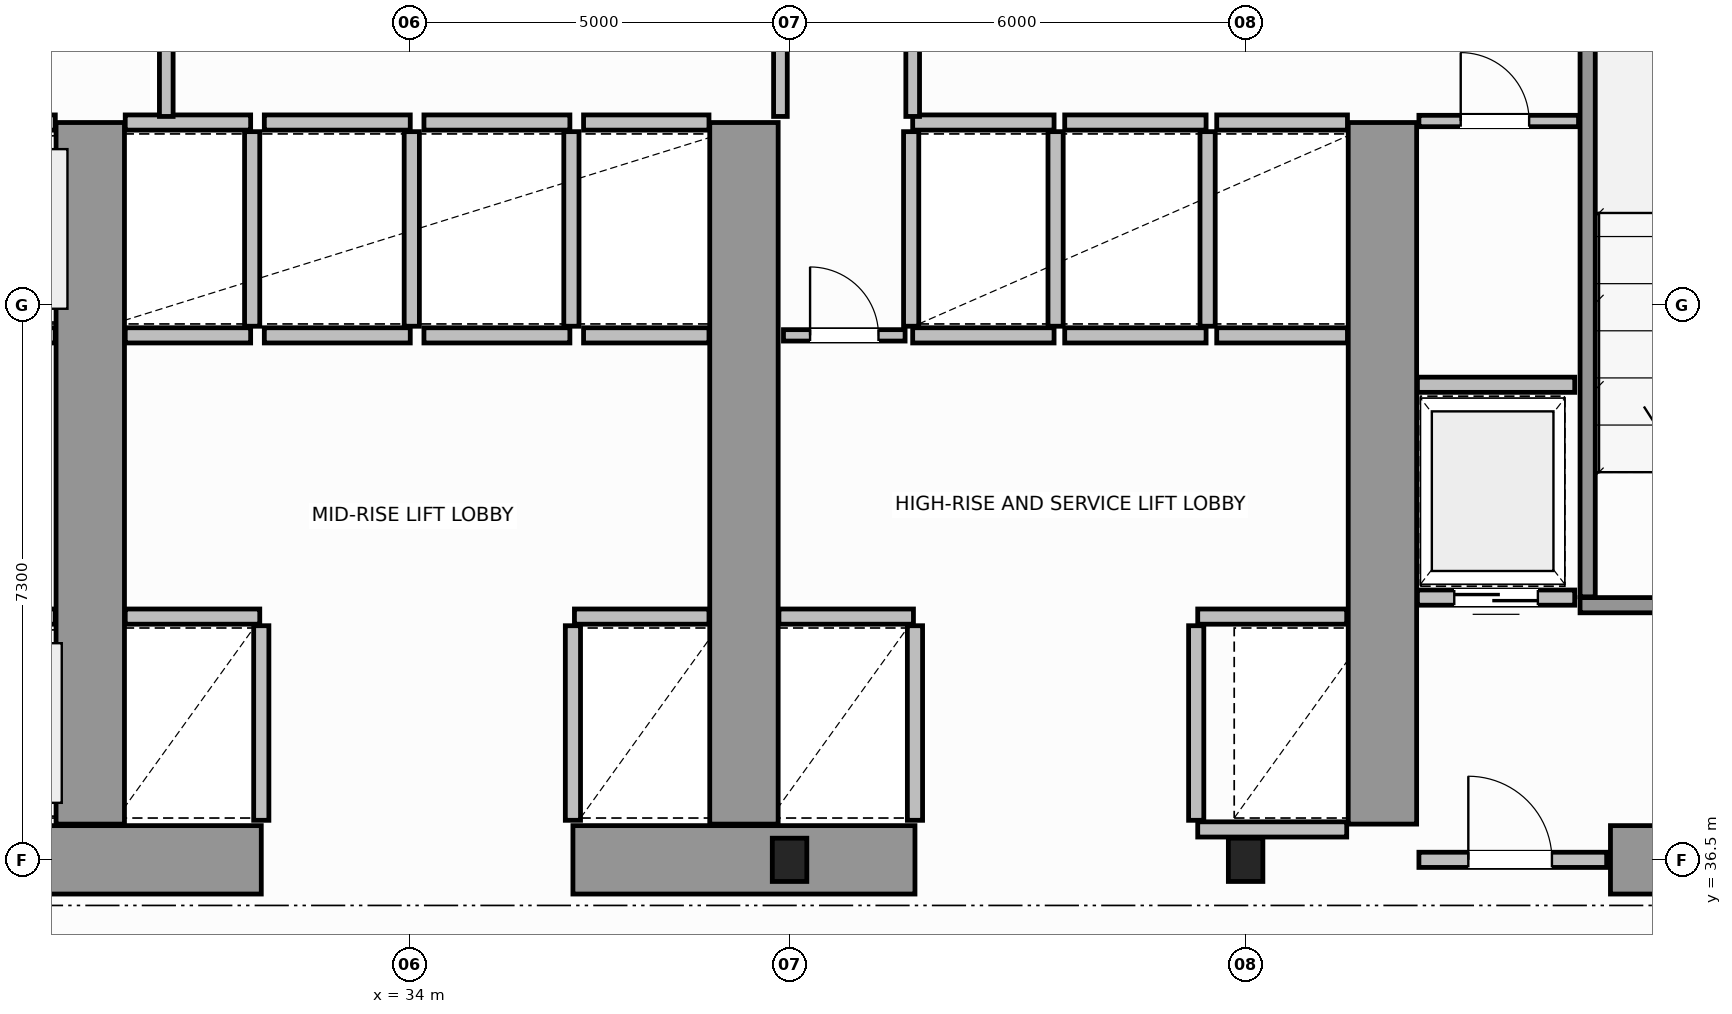
"""IFC4 building model, lengths in metres.
Left out: names, types, materials, properties, quantities, classifications, styles, units other than length and angle.
Written with IfcOpenShell. Run it as: python <this file> out.ifc"""

import sys

from ifc_helpers import new_model, si_unit, direction, frame, frame_2d, origin, origin_2d, place, context, subcontext, project, spatial, rectangle, i_section, extrude, source, transform, mapped, element, fill, save


model = new_model("IFC4")
c1 = context("Model", 3, precision=1e-05, world=origin(), true_north=direction((0.0, 1.0)))
c2 = subcontext(c1, "Body", "Model", "MODEL_VIEW")
j1 = project(units=[si_unit("LENGTHUNIT", "METRE"), si_unit("PLANEANGLEUNIT", "RADIAN")], contexts=[c1])
p1 = place(None, origin())
s1 = spatial("IfcSite", under=j1, at=p1, CompositionType="ELEMENT")
p2 = place(p1, origin())
s2 = spatial("IfcBuilding", under=s1, at=p2, CompositionType="ELEMENT")
p3 = place(p2, frame((0.0, 0.0, 30.2)))
s3 = spatial("IfcBuildingStorey", under=s2, at=p3, CompositionType="ELEMENT", Elevation=30.2)
m1 = source(origin(), c2, "Body", "SweptSolid", [
    extrude(i_section(OverallWidth=0.454, OverallDepth=0.569, WebThickness=0.078, FlangeThickness=0.08, FilletRadius=0.015, at=origin_2d()), origin(), (0.0, 0.0, 1.0), 3.8),
])
for number, where, z_axis, x_axis in (
    (1, (39.0, 36.5, 0.0), (0.0, 0.0, 1.0), (1.0, 0.0, 0.0)),
    (2, (45.0, 36.5, 0.0), (0.0, 0.0, 1.0), (1.0, 0.0, 0.0)),
):
    element("IfcColumn", number, at=place(p3, frame(where, z_axis=z_axis, x_axis=x_axis)), inside=s3, PredefinedType="COLUMN", context=c2, shape_type="MappedRepresentation", body=[
        mapped(m1, transform((0.0, 0.0, 0.0), scale=1.0)),
    ])
for number, where, z_axis, x_axis in (
    (3, (27.55, 36.5, 0.0), (0.0, 0.0, 1.0), (1.0, 0.0, 0.0)),
    (4, (36.15, 36.5, 0.0), (0.0, 0.0, 1.0), (1.0, 0.0, 0.0)),
):
    element("IfcWall", number, at=place(p3, frame(where, z_axis=z_axis, x_axis=x_axis)), inside=s3, PredefinedType="SHEAR", context=c2, shape_type="SweptSolid", body=[
        extrude(rectangle(XDim=4.5, YDim=0.9, at=frame_2d((2.25, 0.0))), origin(), (0.0, 0.0, 1.0), 3.8),
    ])
p4 = place(p3, frame((49.8, 36.5, 0.0), z_axis=(0.0, 0.0, 1.0), x_axis=(1.0, 0.0, 0.0)))
e5 = element("IfcWall", 5, at=p4, inside=s3, PredefinedType="SHEAR", context=c2, shape_type="SweptSolid", body=[
    extrude(rectangle(XDim=3.73, YDim=0.9, at=frame_2d((1.865, 0.0))), origin(), (0.0, 0.0, 1.0), 2.38),
])
for number, where, z_axis, x_axis in (
    (6, (29.8, 36.97, 0.0), (0.0, 0.0, 1.0), (0.0, 1.0, 0.0)),
    (7, (38.4, 36.97, 0.0), (0.0, 0.0, 1.0), (0.0, 1.0, 0.0)),
    (8, (46.8, 36.97, 0.0), (0.0, 0.0, 1.0), (0.0, 1.0, 0.0)),
):
    element("IfcWall", number, at=place(p3, frame(where, z_axis=z_axis, x_axis=x_axis)), inside=s3, PredefinedType="SHEAR", context=c2, shape_type="SweptSolid", body=[
        extrude(rectangle(XDim=9.23, YDim=0.9, at=frame_2d((4.615, 0.0))), origin(), (0.0, 0.0, 1.0), 3.8),
    ])
p5 = place(p3, frame((49.4, 39.85, 0.0), z_axis=(0.0, 0.0, 1.0), x_axis=(1.0, 0.0, 0.0)))
e9 = element("IfcWall", 9, at=p5, inside=s3, PredefinedType="SOLIDWALL", context=c2, shape_type="SweptSolid", body=[
    extrude(rectangle(XDim=4.15, YDim=0.2, at=frame_2d((2.075, 0.0))), origin(), (0.0, 0.0, 1.0), 3.8),
])
p6 = place(p5, frame((1.325, 0.0, 0.0)))
e10 = element("IfcOpeningElement", 10, at=p6, cuts=e9, PredefinedType="OPENING", context=c2, shape_type="SweptSolid", body=[
    extrude(rectangle(XDim=1.1, YDim=2.15, at=frame_2d((0.55, 1.075))), frame((0.0, 0.11, 0.0), z_axis=(0.0, -1.0, 0.0), x_axis=(1.0, 0.0, 0.0)), (0.0, 0.0, 1.0), 0.22),
])
p7 = place(p3, frame((49.5, 39.96, 0.0), z_axis=(0.0, 0.0, 1.0), x_axis=(0.0, 1.0, 0.0)))
e11 = element("IfcWall", 11, at=p7, inside=s3, PredefinedType="SOLIDWALL", context=c2, shape_type="SweptSolid", body=[
    extrude(rectangle(XDim=9.93, YDim=0.2, at=frame_2d((4.965, 0.0))), origin(), (0.0, 0.0, 1.0), 3.8),
])
p8 = place(p3, frame((47.28, 36.5, 0.0), z_axis=(0.0, 0.0, 1.0), x_axis=(1.0, 0.0, 0.0)))
e12 = element("IfcWall", 12, at=p8, inside=s3, PredefinedType="SOLIDWALL", context=c2, shape_type="SweptSolid", body=[
    extrude(rectangle(XDim=2.47, YDim=0.2, at=frame_2d((1.235, 0.0))), origin(), (0.0, 0.0, 1.0), 2.37),
])
p9 = place(p8, frame((0.65, 0.0, 0.0)))
e13 = element("IfcOpeningElement", 13, at=p9, cuts=e12, PredefinedType="OPENING", context=c2, shape_type="SweptSolid", body=[
    extrude(rectangle(XDim=1.1, YDim=2.15, at=frame_2d((0.55, 1.075))), frame((0.0, 0.11, 0.0), z_axis=(0.0, -1.0, 0.0), x_axis=(1.0, 0.0, 0.0)), (0.0, 0.0, 1.0), 0.22),
])
p10 = place(p3, frame((27.57, 39.7, 0.0), z_axis=(0.0, 0.0, 1.0), x_axis=(1.0, 0.0, 0.0)))
e14 = element("IfcWall", 14, at=p10, inside=s3, PredefinedType="SOLIDWALL", context=c2, shape_type="SweptSolid", body=[
    extrude(rectangle(XDim=1.77, YDim=0.2, at=frame_2d((0.885, 0.0))), origin(), (0.0, 0.0, 1.0), 3.58),
])
p11 = place(p10, frame((0.335, 0.0, 0.0)))
e15 = element("IfcOpeningElement", 15, at=p11, cuts=e14, PredefinedType="OPENING", context=c2, shape_type="SweptSolid", body=[
    extrude(rectangle(XDim=1.1, YDim=2.15, at=frame_2d((0.55, 1.075))), frame((0.0, 0.11, 0.0), z_axis=(0.0, -1.0, 0.0), x_axis=(1.0, 0.0, 0.0)), (0.0, 0.0, 1.0), 0.22),
])
p12 = place(p3, frame((27.69, 43.4, 0.0), z_axis=(0.0, 0.0, 1.0), x_axis=(1.0, 0.0, 0.0)))
e16 = element("IfcWall", 16, at=p12, inside=s3, PredefinedType="SOLIDWALL", context=c2, shape_type="SweptSolid", body=[
    extrude(rectangle(XDim=1.65, YDim=0.2, at=frame_2d((0.825, 0.0))), origin(), (0.0, 0.0, 1.0), 3.58),
])
p13 = place(p12, frame((0.275, 0.0, 0.0)))
e17 = element("IfcOpeningElement", 17, at=p13, cuts=e16, PredefinedType="OPENING", context=c2, shape_type="SweptSolid", body=[
    extrude(rectangle(XDim=1.1, YDim=2.15, at=frame_2d((0.55, 1.075))), frame((0.0, 0.11, 0.0), z_axis=(0.0, -1.0, 0.0), x_axis=(1.0, 0.0, 0.0)), (0.0, 0.0, 1.0), 0.22),
])
p14 = place(p3, frame((27.69, 46.2, 0.0), z_axis=(0.0, 0.0, 1.0), x_axis=(1.0, 0.0, 0.0)))
e18 = element("IfcWall", 18, at=p14, inside=s3, PredefinedType="SOLIDWALL", context=c2, shape_type="SweptSolid", body=[
    extrude(rectangle(XDim=1.65, YDim=0.2, at=frame_2d((0.825, 0.0))), origin(), (0.0, 0.0, 1.0), 3.58),
])
p15 = place(p3, frame((30.26, 39.7, 0.0), z_axis=(0.0, 0.0, 1.0), x_axis=(1.0, 0.0, 0.0)))
e19 = element("IfcWall", 19, at=p15, inside=s3, PredefinedType="SOLIDWALL", context=c2, shape_type="SweptSolid", body=[
    extrude(rectangle(XDim=1.77, YDim=0.2, at=frame_2d((0.885, 0.0))), origin(), (0.0, 0.0, 1.0), 3.58),
])
p16 = place(p3, frame((32.05, 37.02, 0.0), z_axis=(0.0, 0.0, 1.0), x_axis=(0.0, 1.0, 0.0)))
e20 = element("IfcWall", 20, at=p16, inside=s3, PredefinedType="SOLIDWALL", context=c2, shape_type="SweptSolid", body=[
    extrude(rectangle(XDim=2.56, YDim=0.2, at=frame_2d((1.28, 0.0))), origin(), (0.0, 0.0, 1.0), 3.58),
])
p17 = place(p3, frame((36.17, 39.7, 0.0), z_axis=(0.0, 0.0, 1.0), x_axis=(1.0, 0.0, 0.0)))
e21 = element("IfcWall", 21, at=p17, inside=s3, PredefinedType="SOLIDWALL", context=c2, shape_type="SweptSolid", body=[
    extrude(rectangle(XDim=1.77, YDim=0.2, at=frame_2d((0.885, 0.0))), origin(), (0.0, 0.0, 1.0), 3.58),
])
p18 = place(p3, frame((36.15, 37.02, 0.0), z_axis=(0.0, 0.0, 1.0), x_axis=(0.0, 1.0, 0.0)))
e22 = element("IfcWall", 22, at=p18, inside=s3, PredefinedType="SOLIDWALL", context=c2, shape_type="SweptSolid", body=[
    extrude(rectangle(XDim=2.56, YDim=0.2, at=frame_2d((1.28, 0.0))), origin(), (0.0, 0.0, 1.0), 3.58),
])
for number, where, z_axis, x_axis in (
    (23, (30.26, 43.4, 0.0), (0.0, 0.0, 1.0), (1.0, 0.0, 0.0)),
    (24, (30.26, 46.2, 0.0), (0.0, 0.0, 1.0), (1.0, 0.0, 0.0)),
):
    element("IfcWall", number, at=place(p3, frame(where, z_axis=z_axis, x_axis=x_axis)), inside=s3, PredefinedType="SOLIDWALL", context=c2, shape_type="SweptSolid", body=[
        extrude(rectangle(XDim=1.65, YDim=0.2, at=frame_2d((0.825, 0.0))), origin(), (0.0, 0.0, 1.0), 3.58),
    ])
p19 = place(p3, frame((31.93, 43.52, 0.0), z_axis=(0.0, 0.0, 1.0), x_axis=(0.0, 1.0, 0.0)))
e25 = element("IfcWall", 25, at=p19, inside=s3, PredefinedType="SOLIDWALL", context=c2, shape_type="SweptSolid", body=[
    extrude(rectangle(XDim=2.56, YDim=0.2, at=frame_2d((1.28, 0.0))), origin(), (0.0, 0.0, 1.0), 3.58),
])
for number, where, z_axis, x_axis in (
    (26, (32.09, 43.4, 0.0), (0.0, 0.0, 1.0), (1.0, 0.0, 0.0)),
    (27, (32.09, 46.2, 0.0), (0.0, 0.0, 1.0), (1.0, 0.0, 0.0)),
):
    element("IfcWall", number, at=place(p3, frame(where, z_axis=z_axis, x_axis=x_axis)), inside=s3, PredefinedType="SOLIDWALL", context=c2, shape_type="SweptSolid", body=[
        extrude(rectangle(XDim=1.92, YDim=0.2, at=frame_2d((0.96, 0.0))), origin(), (0.0, 0.0, 1.0), 3.58),
    ])
p20 = place(p3, frame((34.03, 43.52, 0.0), z_axis=(0.0, 0.0, 1.0), x_axis=(0.0, 1.0, 0.0)))
e28 = element("IfcWall", 28, at=p20, inside=s3, PredefinedType="SOLIDWALL", context=c2, shape_type="SweptSolid", body=[
    extrude(rectangle(XDim=2.56, YDim=0.2, at=frame_2d((1.28, 0.0))), origin(), (0.0, 0.0, 1.0), 3.58),
])
for number, where, z_axis, x_axis in (
    (29, (34.19, 43.4, 0.0), (0.0, 0.0, 1.0), (1.0, 0.0, 0.0)),
    (30, (34.19, 46.2, 0.0), (0.0, 0.0, 1.0), (1.0, 0.0, 0.0)),
):
    element("IfcWall", number, at=place(p3, frame(where, z_axis=z_axis, x_axis=x_axis)), inside=s3, PredefinedType="SOLIDWALL", context=c2, shape_type="SweptSolid", body=[
        extrude(rectangle(XDim=1.92, YDim=0.2, at=frame_2d((0.96, 0.0))), origin(), (0.0, 0.0, 1.0), 3.58),
    ])
p21 = place(p3, frame((36.13, 43.52, 0.0), z_axis=(0.0, 0.0, 1.0), x_axis=(0.0, 1.0, 0.0)))
e31 = element("IfcWall", 31, at=p21, inside=s3, PredefinedType="SOLIDWALL", context=c2, shape_type="SweptSolid", body=[
    extrude(rectangle(XDim=2.56, YDim=0.2, at=frame_2d((1.28, 0.0))), origin(), (0.0, 0.0, 1.0), 3.58),
])
for number, where, z_axis, x_axis in (
    (32, (36.29, 43.4, 0.0), (0.0, 0.0, 1.0), (1.0, 0.0, 0.0)),
    (33, (36.29, 46.2, 0.0), (0.0, 0.0, 1.0), (1.0, 0.0, 0.0)),
):
    element("IfcWall", number, at=place(p3, frame(where, z_axis=z_axis, x_axis=x_axis)), inside=s3, PredefinedType="SOLIDWALL", context=c2, shape_type="SweptSolid", body=[
        extrude(rectangle(XDim=1.65, YDim=0.2, at=frame_2d((0.825, 0.0))), origin(), (0.0, 0.0, 1.0), 3.58),
    ])
p22 = place(p3, frame((38.86, 39.7, 0.0), z_axis=(0.0, 0.0, 1.0), x_axis=(1.0, 0.0, 0.0)))
e34 = element("IfcWall", 34, at=p22, inside=s3, PredefinedType="SOLIDWALL", context=c2, shape_type="SweptSolid", body=[
    extrude(rectangle(XDim=1.77, YDim=0.2, at=frame_2d((0.885, 0.0))), origin(), (0.0, 0.0, 1.0), 3.58),
])
p23 = place(p3, frame((40.65, 37.02, 0.0), z_axis=(0.0, 0.0, 1.0), x_axis=(0.0, 1.0, 0.0)))
e35 = element("IfcWall", 35, at=p23, inside=s3, PredefinedType="SOLIDWALL", context=c2, shape_type="SweptSolid", body=[
    extrude(rectangle(XDim=2.56, YDim=0.2, at=frame_2d((1.28, 0.0))), origin(), (0.0, 0.0, 1.0), 3.58),
])
p24 = place(p3, frame((44.37, 39.7, 0.0), z_axis=(0.0, 0.0, 1.0), x_axis=(1.0, 0.0, 0.0)))
e36 = element("IfcWall", 36, at=p24, inside=s3, PredefinedType="SOLIDWALL", context=c2, shape_type="SweptSolid", body=[
    extrude(rectangle(XDim=1.96, YDim=0.2, at=frame_2d((0.98, 0.0))), origin(), (0.0, 0.0, 1.0), 3.58),
])
p25 = place(p3, frame((44.37, 36.9, 0.0), z_axis=(0.0, 0.0, 1.0), x_axis=(1.0, 0.0, 0.0)))
e37 = element("IfcWall", 37, at=p25, inside=s3, PredefinedType="SOLIDWALL", context=c2, shape_type="SweptSolid", body=[
    extrude(rectangle(XDim=1.96, YDim=0.2, at=frame_2d((0.98, 0.0))), origin(), (0.0, 0.0, 1.0), 2.37),
])
p26 = place(p3, frame((44.35, 37.02, 0.0), z_axis=(0.0, 0.0, 1.0), x_axis=(0.0, 1.0, 0.0)))
e38 = element("IfcWall", 38, at=p26, inside=s3, PredefinedType="SOLIDWALL", context=c2, shape_type="SweptSolid", body=[
    extrude(rectangle(XDim=2.56, YDim=0.2, at=frame_2d((1.28, 0.0))), origin(), (0.0, 0.0, 1.0), 3.58),
])
for number, where, z_axis, x_axis in (
    (39, (40.62, 43.4, 0.0), (0.0, 0.0, 1.0), (1.0, 0.0, 0.0)),
    (40, (40.62, 46.2, 0.0), (0.0, 0.0, 1.0), (1.0, 0.0, 0.0)),
):
    element("IfcWall", number, at=place(p3, frame(where, z_axis=z_axis, x_axis=x_axis)), inside=s3, PredefinedType="SOLIDWALL", context=c2, shape_type="SweptSolid", body=[
        extrude(rectangle(XDim=1.86, YDim=0.2, at=frame_2d((0.93, 0.0))), origin(), (0.0, 0.0, 1.0), 3.58),
    ])
for number, where, z_axis, x_axis in (
    (41, (40.6, 43.52, 0.0), (0.0, 0.0, 1.0), (0.0, 1.0, 0.0)),
    (42, (42.5, 43.52, 0.0), (0.0, 0.0, 1.0), (0.0, 1.0, 0.0)),
):
    element("IfcWall", number, at=place(p3, frame(where, z_axis=z_axis, x_axis=x_axis)), inside=s3, PredefinedType="SOLIDWALL", context=c2, shape_type="SweptSolid", body=[
        extrude(rectangle(XDim=2.56, YDim=0.2, at=frame_2d((1.28, 0.0))), origin(), (0.0, 0.0, 1.0), 3.58),
    ])
for number, where, z_axis, x_axis in (
    (43, (42.62, 43.4, 0.0), (0.0, 0.0, 1.0), (1.0, 0.0, 0.0)),
    (44, (42.62, 46.2, 0.0), (0.0, 0.0, 1.0), (1.0, 0.0, 0.0)),
):
    element("IfcWall", number, at=place(p3, frame(where, z_axis=z_axis, x_axis=x_axis)), inside=s3, PredefinedType="SOLIDWALL", context=c2, shape_type="SweptSolid", body=[
        extrude(rectangle(XDim=1.86, YDim=0.2, at=frame_2d((0.93, 0.0))), origin(), (0.0, 0.0, 1.0), 3.58),
    ])
p27 = place(p3, frame((44.5, 43.52, 0.0), z_axis=(0.0, 0.0, 1.0), x_axis=(0.0, 1.0, 0.0)))
e45 = element("IfcWall", 45, at=p27, inside=s3, PredefinedType="SOLIDWALL", context=c2, shape_type="SweptSolid", body=[
    extrude(rectangle(XDim=2.56, YDim=0.2, at=frame_2d((1.28, 0.0))), origin(), (0.0, 0.0, 1.0), 3.58),
])
for number, where, z_axis, x_axis in (
    (46, (44.62, 43.4, 0.0), (0.0, 0.0, 1.0), (1.0, 0.0, 0.0)),
    (47, (44.62, 46.2, 0.0), (0.0, 0.0, 1.0), (1.0, 0.0, 0.0)),
):
    element("IfcWall", number, at=place(p3, frame(where, z_axis=z_axis, x_axis=x_axis)), inside=s3, PredefinedType="SOLIDWALL", context=c2, shape_type="SweptSolid", body=[
        extrude(rectangle(XDim=1.72, YDim=0.2, at=frame_2d((0.86, 0.0))), origin(), (0.0, 0.0, 1.0), 3.58),
    ])
p28 = place(p3, frame((47.26, 39.95, 0.0), z_axis=(0.0, 0.0, 1.0), x_axis=(1.0, 0.0, 0.0)))
e48 = element("IfcWall", 48, at=p28, inside=s3, PredefinedType="SOLIDWALL", context=c2, shape_type="SweptSolid", body=[
    extrude(rectangle(XDim=2.07, YDim=0.2, at=frame_2d((1.035, 0.0))), origin(), (0.0, 0.0, 1.0), 3.58),
])
p29 = place(p28, frame((0.485, 0.0, 0.0)))
e49 = element("IfcOpeningElement", 49, at=p29, cuts=e48, PredefinedType="OPENING", context=c2, shape_type="SweptSolid", body=[
    extrude(rectangle(XDim=1.1, YDim=2.15, at=frame_2d((0.55, 1.075))), frame((0.0, 0.11, 0.0), z_axis=(0.0, -1.0, 0.0), x_axis=(1.0, 0.0, 0.0)), (0.0, 0.0, 1.0), 0.22),
])
p30 = place(p3, frame((47.26, 42.75, 0.0), z_axis=(0.0, 0.0, 1.0), x_axis=(1.0, 0.0, 0.0)))
e50 = element("IfcWall", 50, at=p30, inside=s3, PredefinedType="SOLIDWALL", context=c2, shape_type="SweptSolid", body=[
    extrude(rectangle(XDim=2.07, YDim=0.2, at=frame_2d((1.035, 0.0))), origin(), (0.0, 0.0, 1.0), 3.58),
])
p31 = place(p3, frame((47.28, 46.22, 0.0), z_axis=(0.0, 0.0, 1.0), x_axis=(1.0, 0.0, 0.0)))
e51 = element("IfcWall", 51, at=p31, inside=s3, PredefinedType="PARTITIONING", context=c2, shape_type="SweptSolid", body=[
    extrude(rectangle(XDim=2.1, YDim=0.15, at=frame_2d((1.05, 0.0))), origin(), (0.0, 0.0, 1.0), 3.58),
])
p32 = place(p31, frame((0.55, 0.0, 0.0)))
e52 = element("IfcOpeningElement", 52, at=p32, cuts=e51, PredefinedType="OPENING", context=c2, shape_type="SweptSolid", body=[
    extrude(rectangle(XDim=0.9, YDim=2.1, at=frame_2d((0.45, 1.05))), frame((0.0, 0.085, 0.0), z_axis=(0.0, -1.0, 0.0), x_axis=(1.0, 0.0, 0.0)), (0.0, 0.0, 1.0), 0.17),
])
p33 = place(p3, frame((38.92, 43.4, 0.0), z_axis=(0.0, 0.0, 1.0), x_axis=(1.0, 0.0, 0.0)))
e53 = element("IfcWall", 53, at=p33, inside=s3, PredefinedType="PARTITIONING", context=c2, shape_type="SweptSolid", body=[
    extrude(rectangle(XDim=1.6, YDim=0.15, at=frame_2d((0.8, 0.0))), origin(), (0.0, 0.0, 1.0), 3.58),
])
p34 = place(p33, frame((0.35, 0.0, 0.0)))
e54 = element("IfcOpeningElement", 54, at=p34, cuts=e53, PredefinedType="OPENING", context=c2, shape_type="SweptSolid", body=[
    extrude(rectangle(XDim=0.9, YDim=2.1, at=frame_2d((0.45, 1.05))), frame((0.0, 0.085, 0.0), z_axis=(0.0, -1.0, 0.0), x_axis=(1.0, 0.0, 0.0)), (0.0, 0.0, 1.0), 0.17),
])
for number, where, z_axis, x_axis in (
    (55, (30.8, 46.28, 0.0), (0.0, 0.0, 1.0), (0.0, 1.0, 0.0)),
    (56, (38.88, 46.28, 0.0), (0.0, 0.0, 1.0), (0.0, 1.0, 0.0)),
):
    element("IfcWall", number, at=place(p3, frame(where, z_axis=z_axis, x_axis=x_axis)), inside=s3, PredefinedType="PLUMBINGWALL", context=c2, shape_type="SweptSolid", body=[
        extrude(rectangle(XDim=1.94, YDim=0.18, at=frame_2d((0.97, 0.0))), origin(), (0.0, 0.0, 1.0), 3.58),
    ])
p35 = place(p3, frame((40.62, 46.28, 0.0), z_axis=(0.0, 0.0, 1.0), x_axis=(0.0, 1.0, 0.0)))
e57 = element("IfcWall", 57, at=p35, inside=s3, PredefinedType="PLUMBINGWALL", context=c2, shape_type="SweptSolid", body=[
    extrude(rectangle(XDim=2.0, YDim=0.18, at=frame_2d((1.0, 0.0))), origin(), (0.0, 0.0, 1.0), 3.58),
])
m2 = source(origin(), c2, "Body", "SweptSolid", [
    extrude(rectangle(XDim=1.1, YDim=2.15, at=frame_2d((0.55, 1.075))), frame((0.0, 0.025, 0.0), z_axis=(0.0, -1.0, 0.0), x_axis=(1.0, 0.0, 0.0)), (0.0, 0.0, 1.0), 0.05),
])
p36 = place(p9, origin())
e58 = element("IfcDoor", 58, at=p36, inside=s3, OperationType="SINGLE_SWING_LEFT", PredefinedType="DOOR", context=c2, shape_type="MappedRepresentation", body=[
    mapped(m2, transform((0.0, 0.0, 0.0), scale=1.0)),
])
fill(e13, e58)
p37 = place(p29, origin())
e59 = element("IfcDoor", 59, at=p37, inside=s3, OperationType="DOUBLE_DOOR_SLIDING", PredefinedType="DOOR", context=c2, shape_type="MappedRepresentation", body=[
    mapped(m2, transform((0.0, 0.0, 0.0), scale=1.0)),
])
fill(e49, e59)
m3 = source(origin(), c2, "Body", "SweptSolid", [
    extrude(rectangle(XDim=0.9, YDim=2.1, at=frame_2d((0.45, 1.05))), frame((0.0, 0.025, 0.0), z_axis=(0.0, -1.0, 0.0), x_axis=(1.0, 0.0, 0.0)), (0.0, 0.0, 1.0), 0.05),
])
p38 = place(p32, origin())
e60 = element("IfcDoor", 60, at=p38, inside=s3, OperationType="SINGLE_SWING_RIGHT", PredefinedType="DOOR", context=c2, shape_type="MappedRepresentation", body=[
    mapped(m3, transform((0.0, 0.0, 0.0), scale=1.0)),
])
fill(e52, e60)
p39 = place(p34, origin())
e61 = element("IfcDoor", 61, at=p39, inside=s3, OperationType="SINGLE_SWING_LEFT", PredefinedType="DOOR", context=c2, shape_type="MappedRepresentation", body=[
    mapped(m3, transform((0.0, 0.0, 0.0), scale=1.0)),
])
fill(e54, e61)
save(model, sys.argv[1])
